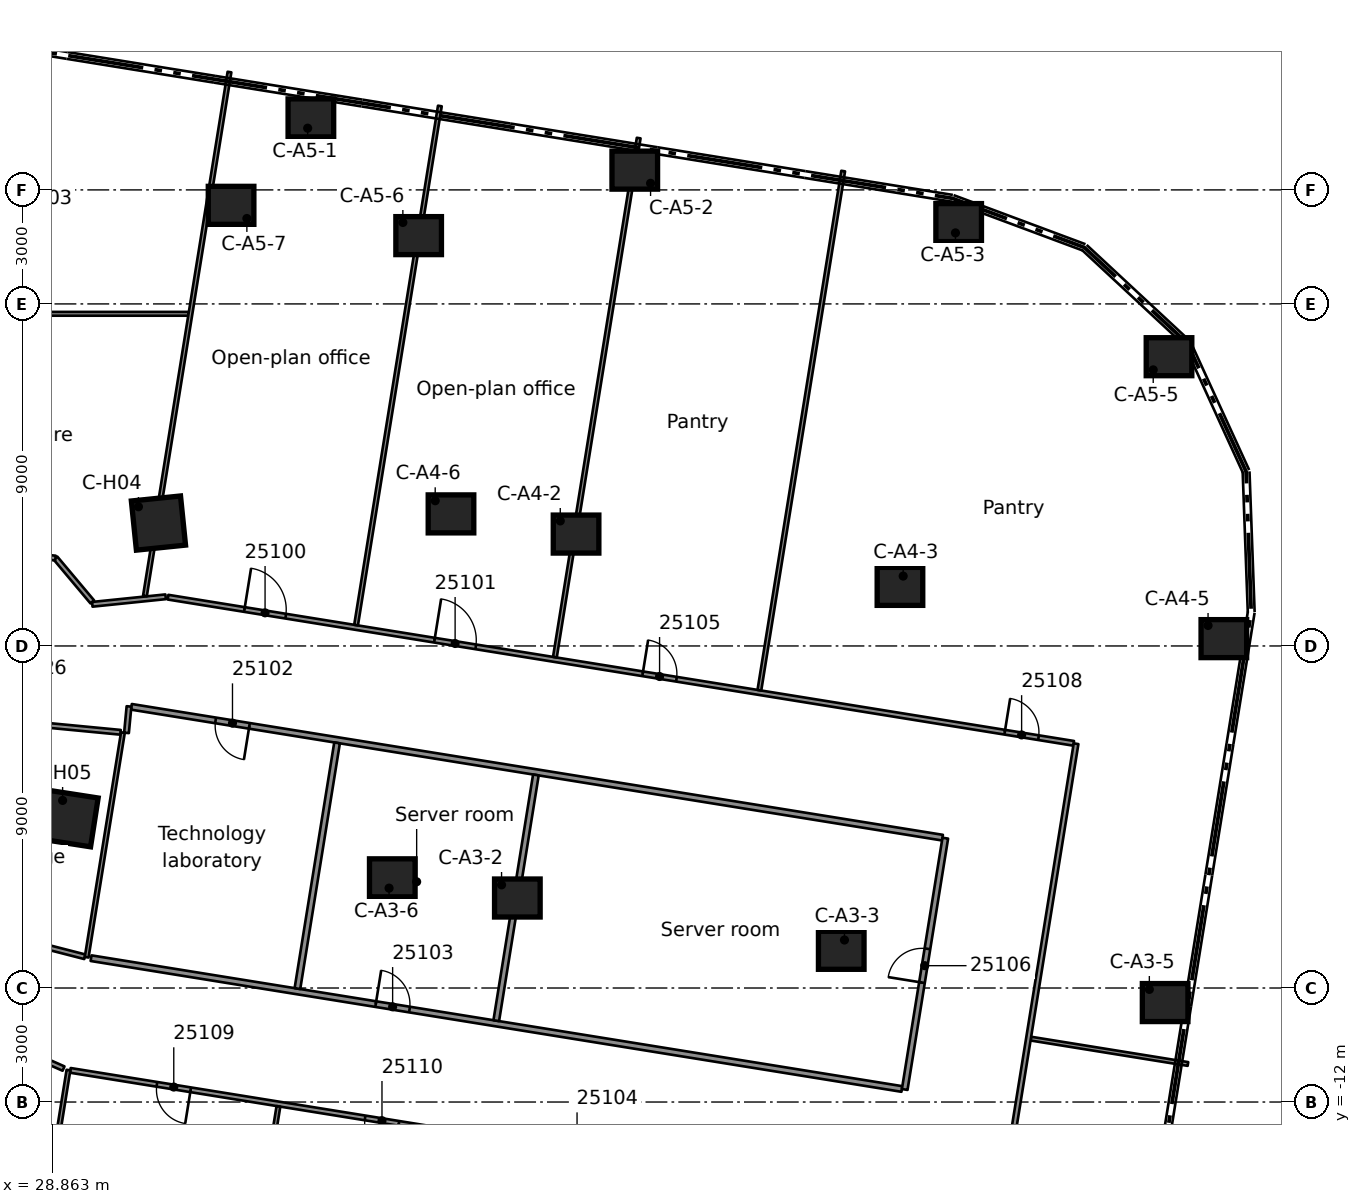
"""IFC4 building model, lengths in metres.
Left out: names, types, materials, properties, quantities, classifications, styles, units other than length and angle.
Written with IfcOpenShell. Run it as: python <this file> out.ifc"""

import sys

from ifc_helpers import new_model, si_unit, direction, frame, frame_2d, origin, origin_2d, place, context, subcontext, project, spatial, rectangle, extrude, element, fill, save


model = new_model("IFC4")
c1 = context("Model", 3, precision=1e-05, world=origin(), true_north=direction((0.0, 1.0)))
c2 = subcontext(c1, "Body", "Model", "MODEL_VIEW")
j1 = project(units=[si_unit("LENGTHUNIT", "METRE"), si_unit("PLANEANGLEUNIT", "RADIAN")], contexts=[c1])
p1 = place(None, origin())
s1 = spatial("IfcSite", under=j1, at=p1, CompositionType="ELEMENT")
p2 = place(p1, origin())
s2 = spatial("IfcBuilding", under=s1, at=p2, CompositionType="ELEMENT")
p3 = place(p2, frame((0.0, 0.0, 127.2)))
s3 = spatial("IfcBuildingStorey", under=s2, at=p3, CompositionType="ELEMENT", Elevation=127.2)
for number, where, z_axis, x_axis in (
    (1, (41.102, -6.632, 0.0), (0.0, 0.0, 1.0), (1.0, 0.0, 0.0)),
    (2, (49.625, -8.008, 0.0), (0.0, 0.0, 1.0), (1.0, 0.0, 0.0)),
    (3, (58.148, -9.383, 0.0), (0.0, 0.0, 1.0), (1.0, 0.0, 0.0)),
    (4, (37.811, -6.101, 0.0), (0.0, 0.0, 1.0), (1.0, 0.0, 0.0)),
    (5, (42.647, 2.944, 0.0), (0.0, 0.0, 1.0), (1.0, 0.0, 0.0)),
    (6, (51.17, 1.568, 0.0), (0.0, 0.0, 1.0), (1.0, 0.0, 0.0)),
    (7, (59.693, 0.193, 0.0), (0.0, 0.0, 1.0), (1.0, 0.0, 0.0)),
    (8, (39.356, 3.475, 0.0), (0.0, 0.0, 1.0), (1.0, 0.0, 0.0)),
    (9, (35.669, 13.895, 0.0), (0.0, 0.0, 1.0), (1.0, 0.0, 0.0)),
    (10, (44.192, 12.52, 0.0), (0.0, 0.0, 1.0), (1.0, 0.0, 0.0)),
    (11, (52.715, 11.14, 0.0), (0.0, 0.0, 1.0), (1.0, 0.0, 0.0)),
    (12, (58.25, 7.611, 0.0), (0.0, 0.0, 1.0), (1.0, 0.0, 0.0)),
    (13, (38.505, 10.797, 0.0), (0.0, 0.0, 1.0), (1.0, 0.0, 0.0)),
    (14, (33.569, 11.594, 0.0), (0.0, 0.0, 1.0), (1.0, 0.0, 0.0)),
):
    element("IfcColumn", number, at=place(p3, frame(where, z_axis=z_axis, x_axis=x_axis)), inside=s3, PredefinedType="COLUMN", context=c2, shape_type="SweptSolid", body=[
        extrude(rectangle(XDim=1.2, YDim=1.0, at=origin_2d()), origin(), (0.0, 0.0, 1.0), 3.5),
    ])
for number, where, z_axis, x_axis in (
    (15, (31.658, 3.234, 0.0), (0.0, 0.0, 1.0), (0.995, 0.102, 0.0)),
    (16, (29.329, -4.543, 0.0), (0.0, 0.0, 1.0), (0.988, -0.153, 0.0)),
):
    element("IfcColumn", number, at=place(p3, frame(where, z_axis=z_axis, x_axis=x_axis)), inside=s3, PredefinedType="COLUMN", context=c2, shape_type="SweptSolid", body=[
        extrude(rectangle(XDim=1.3, YDim=1.3, at=origin_2d()), origin(), (0.0, 0.0, 1.0), 3.5),
    ])
p4 = place(p3, frame((29.918, 1.158, 0.0), z_axis=(0.0, 0.0, 1.0), x_axis=(-0.643093382336, 0.765787765374, 0.0)))
e17 = element("IfcWall", 17, at=p4, inside=s3, PredefinedType="PARTITIONING", context=c2, shape_type="SweptSolid", body=[
    extrude(rectangle(XDim=1.508, YDim=0.125, at=frame_2d((0.754, 0.0))), origin(), (0.0, 0.0, 1.0), 3.08),
])
p5 = place(p3, frame((26.094, -9.763, 0.0), z_axis=(0.0, 0.0, 1.0), x_axis=(0.914414080566, -0.404780050475, 0.0)))
e18 = element("IfcWall", 18, at=p5, inside=s3, PredefinedType="PARTITIONING", context=c2, shape_type="SweptSolid", body=[
    extrude(rectangle(XDim=3.353, YDim=0.125, at=frame_2d((1.676, 0.0))), origin(), (0.0, 0.0, 1.0), 3.08),
])
p6 = place(p3, frame((25.95, -7.208, 0.0), z_axis=(0.0, 0.0, 1.0), x_axis=(0.968475214554, -0.249109933149, 0.0)))
e19 = element("IfcWall", 19, at=p6, inside=s3, PredefinedType="PARTITIONING", context=c2, shape_type="SweptSolid", body=[
    extrude(rectangle(XDim=3.894, YDim=0.125, at=frame_2d((1.947, 0.0))), origin(), (0.0, 0.0, 1.0), 3.08),
])
p7 = place(p3, frame((53.719, -15.1, 0.0), z_axis=(0.0, 0.0, 1.0), x_axis=(-0.987235605508, 0.159266629328, 0.0)))
e20 = element("IfcWall", 20, at=p7, inside=s3, PredefinedType="PARTITIONING", context=c2, shape_type="SweptSolid", body=[
    extrude(rectangle(XDim=24.695, YDim=0.125, at=frame_2d((12.348, 0.0))), origin(), (0.0, 0.0, 1.0), 3.08),
])
p8 = place(p7, frame((10.739, 0.0, 0.0)))
e21 = element("IfcOpeningElement", 21, at=p8, cuts=e20, PredefinedType="OPENING", context=c2, shape_type="SweptSolid", body=[
    extrude(rectangle(XDim=0.9, YDim=2.1, at=frame_2d((0.45, 1.05))), frame((0.0, 0.073, 0.0), z_axis=(0.0, -1.0, 0.0), x_axis=(1.0, 0.0, 0.0)), (0.0, 0.0, 1.0), 0.145),
])
p9 = place(p7, frame((1.038, 0.0, 0.0)))
e22 = element("IfcOpeningElement", 22, at=p9, cuts=e20, PredefinedType="OPENING", context=c2, shape_type="SweptSolid", body=[
    extrude(rectangle(XDim=0.9, YDim=2.1, at=frame_2d((0.45, 1.05))), frame((0.0, 0.073, 0.0), z_axis=(0.0, -1.0, 0.0), x_axis=(1.0, 0.0, 0.0)), (0.0, 0.0, 1.0), 0.145),
])
p10 = place(p7, frame((21.488, 0.0, 0.0)))
e23 = element("IfcOpeningElement", 23, at=p10, cuts=e20, PredefinedType="OPENING", context=c2, shape_type="SweptSolid", body=[
    extrude(rectangle(XDim=0.9, YDim=2.1, at=frame_2d((0.45, 1.05))), frame((0.0, 0.073, 0.0), z_axis=(0.0, -1.0, 0.0), x_axis=(1.0, 0.0, 0.0)), (0.0, 0.0, 1.0), 0.145),
])
p11 = place(p7, frame((15.938, 0.0, 0.0)))
e24 = element("IfcOpeningElement", 24, at=p11, cuts=e20, PredefinedType="OPENING", context=c2, shape_type="SweptSolid", body=[
    extrude(rectangle(XDim=0.9, YDim=2.1, at=frame_2d((0.45, 1.05))), frame((0.0, 0.073, 0.0), z_axis=(0.0, -1.0, 0.0), x_axis=(1.0, 0.0, 0.0)), (0.0, 0.0, 1.0), 0.145),
])
p12 = place(p3, frame((29.885, -8.215, 0.0), z_axis=(0.0, 0.0, 1.0), x_axis=(0.987236652076, -0.1592601419, 0.0)))
e25 = element("IfcWall", 25, at=p12, inside=s3, PredefinedType="PARTITIONING", context=c2, shape_type="SweptSolid", body=[
    extrude(rectangle(XDim=21.612, YDim=0.15, at=frame_2d((10.806, 0.0))), origin(), (0.0, 0.0, 1.0), 3.08),
])
p13 = place(p12, frame((7.588, 0.0, 0.0)))
e26 = element("IfcOpeningElement", 26, at=p13, cuts=e25, PredefinedType="OPENING", context=c2, shape_type="SweptSolid", body=[
    extrude(rectangle(XDim=0.9, YDim=2.1, at=frame_2d((0.45, 1.05))), frame((0.0, 0.085, 0.0), z_axis=(0.0, -1.0, 0.0), x_axis=(1.0, 0.0, 0.0)), (0.0, 0.0, 1.0), 0.17),
])
p14 = place(p3, frame((54.615, -10.332, 0.0), z_axis=(0.0, 0.0, 1.0), x_axis=(0.987227218169, -0.15931861067, 0.0)))
e27 = element("IfcWall", 27, at=p14, inside=s3, PredefinedType="PARTITIONING", context=c2, shape_type="SweptSolid", body=[
    extrude(rectangle(XDim=4.187, YDim=0.1, at=frame_2d((2.093, 0.0))), origin(), (0.0, 0.0, 1.0), 3.08),
])
p15 = place(p3, frame((52.289, -5.044, 0.0), z_axis=(0.0, 0.0, 1.0), x_axis=(-0.987239001867, 0.159245575114, 0.0)))
e28 = element("IfcWall", 28, at=p15, inside=s3, PredefinedType="PARTITIONING", context=c2, shape_type="SweptSolid", body=[
    extrude(rectangle(XDim=21.62, YDim=0.15, at=frame_2d((10.81, 0.0))), origin(), (0.0, 0.0, 1.0), 3.08),
])
p16 = place(p15, frame((18.475, 0.0, 0.0)))
e29 = element("IfcOpeningElement", 29, at=p16, cuts=e28, PredefinedType="OPENING", context=c2, shape_type="SweptSolid", body=[
    extrude(rectangle(XDim=0.9, YDim=2.1, at=frame_2d((0.45, 1.05))), frame((0.0, 0.085, 0.0), z_axis=(0.0, -1.0, 0.0), x_axis=(1.0, 0.0, 0.0)), (0.0, 0.0, 1.0), 0.17),
])
p17 = place(p3, frame((31.909, 1.284, 0.0), z_axis=(0.0, 0.0, 1.0), x_axis=(0.987227629246, -0.159316063386, 0.0)))
e30 = element("IfcWall", 30, at=p17, inside=s3, PredefinedType="PARTITIONING", context=c2, shape_type="SweptSolid", body=[
    extrude(rectangle(XDim=24.14, YDim=0.125, at=frame_2d((12.07, 0.0))), origin(), (0.0, 0.0, 1.0), 3.08),
])
p18 = place(p17, frame((2.038, 0.0, 0.0)))
e31 = element("IfcOpeningElement", 31, at=p18, cuts=e30, PredefinedType="OPENING", context=c2, shape_type="SweptSolid", body=[
    extrude(rectangle(XDim=1.1, YDim=2.1, at=frame_2d((0.55, 1.05))), frame((0.0, 0.073, 0.0), z_axis=(0.0, -1.0, 0.0), x_axis=(1.0, 0.0, 0.0)), (0.0, 0.0, 1.0), 0.145),
])
p19 = place(p17, frame((7.103, 0.0, 0.0)))
e32 = element("IfcOpeningElement", 32, at=p19, cuts=e30, PredefinedType="OPENING", context=c2, shape_type="SweptSolid", body=[
    extrude(rectangle(XDim=1.1, YDim=2.1, at=frame_2d((0.55, 1.05))), frame((0.0, 0.073, 0.0), z_axis=(0.0, -1.0, 0.0), x_axis=(1.0, 0.0, 0.0)), (0.0, 0.0, 1.0), 0.145),
])
p20 = place(p17, frame((12.653, 0.0, 0.0)))
e33 = element("IfcOpeningElement", 33, at=p20, cuts=e30, PredefinedType="OPENING", context=c2, shape_type="SweptSolid", body=[
    extrude(rectangle(XDim=0.9, YDim=2.1, at=frame_2d((0.45, 1.05))), frame((0.0, 0.073, 0.0), z_axis=(0.0, -1.0, 0.0), x_axis=(1.0, 0.0, 0.0)), (0.0, 0.0, 1.0), 0.145),
])
p21 = place(p17, frame((22.303, 0.0, 0.0)))
e34 = element("IfcOpeningElement", 34, at=p21, cuts=e30, PredefinedType="OPENING", context=c2, shape_type="SweptSolid", body=[
    extrude(rectangle(XDim=0.9, YDim=2.1, at=frame_2d((0.45, 1.05))), frame((0.0, 0.073, 0.0), z_axis=(0.0, -1.0, 0.0), x_axis=(1.0, 0.0, 0.0)), (0.0, 0.0, 1.0), 0.145),
])
p22 = place(p3, frame((30.661, -2.272, 0.0), z_axis=(0.0, 0.0, 1.0), x_axis=(-0.99545016826, 0.095283589939, 0.0)))
e35 = element("IfcWall", 35, at=p22, inside=s3, PredefinedType="PARTITIONING", context=c2, shape_type="SweptSolid", body=[
    extrude(rectangle(XDim=6.119, YDim=0.125, at=frame_2d((3.059, 0.0))), origin(), (0.0, 0.0, 1.0), 3.08),
])
p23 = place(p22, frame((2.538, 0.0, 0.0)))
e36 = element("IfcOpeningElement", 36, at=p23, cuts=e35, PredefinedType="OPENING", context=c2, shape_type="SweptSolid", body=[
    extrude(rectangle(XDim=1.0, YDim=2.1, at=frame_2d((0.5, 1.05))), frame((0.0, 0.073, 0.0), z_axis=(0.0, -1.0, 0.0), x_axis=(1.0, 0.0, 0.0)), (0.0, 0.0, 1.0), 0.145),
])
p24 = place(p3, frame((24.989, 2.692, 0.0), z_axis=(0.0, 0.0, 1.0), x_axis=(0.995451221245, -0.095272588516, 0.0)))
e37 = element("IfcWall", 37, at=p24, inside=s3, PredefinedType="PARTITIONING", context=c2, shape_type="SweptSolid", body=[
    extrude(rectangle(XDim=3.977, YDim=0.125, at=frame_2d((1.989, 0.0))), origin(), (0.0, 0.0, 1.0), 3.08),
])
p25 = place(p3, frame((21.512, 8.74, 0.0), z_axis=(0.0, 0.0, 1.0), x_axis=(1.0, 0.0, 0.0)))
e38 = element("IfcWall", 38, at=p25, inside=s3, PredefinedType="PARTITIONING", context=c2, shape_type="SweptSolid", body=[
    extrude(rectangle(XDim=10.939, YDim=0.1, at=frame_2d((5.469, 0.0))), origin(), (0.0, 0.0, 1.0), 3.08),
])
p26 = place(p3, frame((31.847, 1.294, 0.0), z_axis=(0.0, 0.0, 1.0), x_axis=(-0.9947784907, -0.102057603537, 0.0)))
e39 = element("IfcWall", 39, at=p26, inside=s3, PredefinedType="PARTITIONING", context=c2, shape_type="SweptSolid", body=[
    extrude(rectangle(XDim=1.94, YDim=0.125, at=frame_2d((0.97, 0.0))), origin(), (0.0, 0.0, 1.0), 3.08),
])
p27 = place(p3, frame((53.78, -15.111, 0.0), z_axis=(0.0, 0.0, 1.0), x_axis=(0.159347260632, 0.987222594215, 0.0)))
e40 = element("IfcWall", 40, at=p27, inside=s3, PredefinedType="PARTITIONING", context=c2, shape_type="SweptSolid", body=[
    extrude(rectangle(XDim=12.701, YDim=0.125, at=frame_2d((6.351, 0.0))), origin(), (0.0, 0.0, 1.0), 3.08),
])
p28 = place(p3, frame((51.295, -11.67, 0.0), z_axis=(0.0, 0.0, 1.0), x_axis=(0.159450148398, 0.987205981635, 0.0)))
e41 = element("IfcWall", 41, at=p28, inside=s3, PredefinedType="PARTITIONING", context=c2, shape_type="SweptSolid", body=[
    extrude(rectangle(XDim=6.699, YDim=0.15, at=frame_2d((3.349, 0.0))), origin(), (0.0, 0.0, 1.0), 3.08),
])
p29 = place(p28, frame((2.85, 0.0, 0.0)))
e42 = element("IfcOpeningElement", 42, at=p29, cuts=e41, PredefinedType="OPENING", context=c2, shape_type="SweptSolid", body=[
    extrude(rectangle(XDim=0.9, YDim=2.1, at=frame_2d((0.45, 1.05))), frame((0.0, 0.085, 0.0), z_axis=(0.0, -1.0, 0.0), x_axis=(1.0, 0.0, 0.0)), (0.0, 0.0, 1.0), 0.17),
])
p30 = place(p3, frame((47.471, -1.164, 0.0), z_axis=(0.0, 0.0, 1.0), x_axis=(0.159361135309, 0.987220354608, 0.0)))
e43 = element("IfcWall", 43, at=p30, inside=s3, PredefinedType="PARTITIONING", context=c2, shape_type="SweptSolid", body=[
    extrude(rectangle(XDim=13.837, YDim=0.1, at=frame_2d((6.918, 0.0))), origin(), (0.0, 0.0, 1.0), 3.08),
])
p31 = place(p3, frame((40.547, -9.859, 0.0), z_axis=(0.0, 0.0, 1.0), x_axis=(0.159269947871, 0.987235070135, 0.0)))
e44 = element("IfcWall", 44, at=p31, inside=s3, PredefinedType="PARTITIONING", context=c2, shape_type="SweptSolid", body=[
    extrude(rectangle(XDim=6.548, YDim=0.15, at=frame_2d((3.274, 0.0))), origin(), (0.0, 0.0, 1.0), 3.08),
])
p32 = place(p3, frame((42.09, -0.295, 0.0), z_axis=(0.0, 0.0, 1.0), x_axis=(0.159357818258, 0.987220890055, 0.0)))
e45 = element("IfcWall", 45, at=p32, inside=s3, PredefinedType="PARTITIONING", context=c2, shape_type="SweptSolid", body=[
    extrude(rectangle(XDim=13.836, YDim=0.1, at=frame_2d((6.918, 0.0))), origin(), (0.0, 0.0, 1.0), 3.08),
])
p33 = place(p3, frame((32.61, -25.774, 0.0), z_axis=(0.0, 0.0, 1.0), x_axis=(0.159346714874, 0.987222682306, 0.0)))
e46 = element("IfcWall", 46, at=p33, inside=s3, PredefinedType="PARTITIONING", context=c2, shape_type="SweptSolid", body=[
    extrude(rectangle(XDim=13.837, YDim=0.1, at=frame_2d((6.918, 0.0))), origin(), (0.0, 0.0, 1.0), 3.08),
])
p34 = place(p3, frame((35.315, -9.015, 0.0), z_axis=(0.0, 0.0, 1.0), x_axis=(0.159269947871, 0.987235070135, 0.0)))
e47 = element("IfcWall", 47, at=p34, inside=s3, PredefinedType="PARTITIONING", context=c2, shape_type="SweptSolid", body=[
    extrude(rectangle(XDim=6.548, YDim=0.15, at=frame_2d((3.274, 0.0))), origin(), (0.0, 0.0, 1.0), 3.08),
])
p35 = place(p3, frame((36.858, 0.549, 0.0), z_axis=(0.0, 0.0, 1.0), x_axis=(0.159375015721, 0.987218113876, 0.0)))
e48 = element("IfcWall", 48, at=p35, inside=s3, PredefinedType="PARTITIONING", context=c2, shape_type="SweptSolid", body=[
    extrude(rectangle(XDim=13.836, YDim=0.1, at=frame_2d((6.918, 0.0))), origin(), (0.0, 0.0, 1.0), 3.08),
])
p36 = place(p3, frame((27.075, -24.881, 0.0), z_axis=(0.0, 0.0, 1.0), x_axis=(0.159361105938, 0.987220359349, 0.0)))
e49 = element("IfcWall", 49, at=p36, inside=s3, PredefinedType="PARTITIONING", context=c2, shape_type="SweptSolid", body=[
    extrude(rectangle(XDim=13.9, YDim=0.1, at=frame_2d((6.95, 0.0))), origin(), (0.0, 0.0, 1.0), 3.08),
])
p37 = place(p3, frame((29.769, -8.19, 0.0), z_axis=(0.0, 0.0, 1.0), x_axis=(0.15928627412, 0.987232436094, 0.0)))
e50 = element("IfcWall", 50, at=p37, inside=s3, PredefinedType="PARTITIONING", context=c2, shape_type="SweptSolid", body=[
    extrude(rectangle(XDim=5.988, YDim=0.1, at=frame_2d((2.994, 0.0))), origin(), (0.0, 0.0, 1.0), 3.08),
])
p38 = place(p3, frame((31.302, 1.314, 0.0), z_axis=(0.0, 0.0, 1.0), x_axis=(0.159328073175, 0.987225691065, 0.0)))
e51 = element("IfcWall", 51, at=p38, inside=s3, PredefinedType="PARTITIONING", context=c2, shape_type="SweptSolid", body=[
    extrude(rectangle(XDim=13.966, YDim=0.1, at=frame_2d((6.983, 0.0))), origin(), (0.0, 0.0, 1.0), 3.08),
])
p39 = place(p3, frame((30.817, -2.287, 0.0), z_axis=(0.0, 0.0, 1.0), x_axis=(0.094627831228, 0.995512718933, 0.0)))
e52 = element("IfcWall", 52, at=p39, inside=s3, PredefinedType="PARTITIONING", context=c2, shape_type="SweptSolid", body=[
    extrude(rectangle(XDim=0.699, YDim=0.125, at=frame_2d((0.35, 0.0))), origin(), (0.0, 0.0, 1.0), 3.08),
])
p40 = place(p18, origin())
e53 = element("IfcDoor", 53, at=p40, inside=s3, OperationType="SINGLE_SWING_LEFT", PredefinedType="DOOR", context=c2, shape_type="SweptSolid", body=[
    extrude(rectangle(XDim=1.1, YDim=2.1, at=frame_2d((0.55, 1.05))), frame((0.0, 0.025, 0.0), z_axis=(0.0, -1.0, 0.0), x_axis=(1.0, 0.0, 0.0)), (0.0, 0.0, 1.0), 0.05),
])
fill(e31, e53)
p41 = place(p19, origin())
e54 = element("IfcDoor", 54, at=p41, inside=s3, OperationType="SINGLE_SWING_LEFT", PredefinedType="DOOR", context=c2, shape_type="SweptSolid", body=[
    extrude(rectangle(XDim=1.1, YDim=2.1, at=frame_2d((0.55, 1.05))), frame((0.0, 0.025, 0.0), z_axis=(0.0, -1.0, 0.0), x_axis=(1.0, 0.0, 0.0)), (0.0, 0.0, 1.0), 0.05),
])
fill(e32, e54)
p42 = place(p16, origin())
e55 = element("IfcDoor", 55, at=p42, inside=s3, OperationType="SINGLE_SWING_RIGHT", PredefinedType="DOOR", context=c2, shape_type="SweptSolid", body=[
    extrude(rectangle(XDim=0.9, YDim=2.1, at=frame_2d((0.45, 1.05))), frame((0.0, 0.025, 0.0), z_axis=(0.0, -1.0, 0.0), x_axis=(1.0, 0.0, 0.0)), (0.0, 0.0, 1.0), 0.05),
])
fill(e29, e55)
p43 = place(p13, origin())
e56 = element("IfcDoor", 56, at=p43, inside=s3, OperationType="SINGLE_SWING_LEFT", PredefinedType="DOOR", context=c2, shape_type="SweptSolid", body=[
    extrude(rectangle(XDim=0.9, YDim=2.1, at=frame_2d((0.45, 1.05))), frame((0.0, 0.025, 0.0), z_axis=(0.0, -1.0, 0.0), x_axis=(1.0, 0.0, 0.0)), (0.0, 0.0, 1.0), 0.05),
])
fill(e26, e56)
p44 = place(p20, origin())
e57 = element("IfcDoor", 57, at=p44, inside=s3, OperationType="SINGLE_SWING_RIGHT", PredefinedType="DOOR", context=c2, shape_type="SweptSolid", body=[
    extrude(rectangle(XDim=0.9, YDim=2.1, at=frame_2d((0.45, 1.05))), frame((0.0, 0.025, 0.0), z_axis=(0.0, -1.0, 0.0), x_axis=(1.0, 0.0, 0.0)), (0.0, 0.0, 1.0), 0.05),
])
fill(e33, e57)
p45 = place(p29, origin())
e58 = element("IfcDoor", 58, at=p45, inside=s3, OperationType="SINGLE_SWING_LEFT", PredefinedType="DOOR", context=c2, shape_type="SweptSolid", body=[
    extrude(rectangle(XDim=0.9, YDim=2.1, at=frame_2d((0.45, 1.05))), frame((0.0, 0.025, 0.0), z_axis=(0.0, -1.0, 0.0), x_axis=(1.0, 0.0, 0.0)), (0.0, 0.0, 1.0), 0.05),
])
fill(e42, e58)
p46 = place(p21, origin())
e59 = element("IfcDoor", 59, at=p46, inside=s3, OperationType="SINGLE_SWING_RIGHT", PredefinedType="DOOR", context=c2, shape_type="SweptSolid", body=[
    extrude(rectangle(XDim=0.9, YDim=2.1, at=frame_2d((0.45, 1.05))), frame((0.0, 0.025, 0.0), z_axis=(0.0, -1.0, 0.0), x_axis=(1.0, 0.0, 0.0)), (0.0, 0.0, 1.0), 0.05),
])
fill(e34, e59)
p47 = place(p10, origin())
e60 = element("IfcDoor", 60, at=p47, inside=s3, OperationType="SINGLE_SWING_RIGHT", PredefinedType="DOOR", context=c2, shape_type="SweptSolid", body=[
    extrude(rectangle(XDim=0.9, YDim=2.1, at=frame_2d((0.45, 1.05))), frame((0.0, 0.025, 0.0), z_axis=(0.0, -1.0, 0.0), x_axis=(1.0, 0.0, 0.0)), (0.0, 0.0, 1.0), 0.05),
])
fill(e23, e60)
p48 = place(p11, origin())
e61 = element("IfcDoor", 61, at=p48, inside=s3, OperationType="SINGLE_SWING_RIGHT", PredefinedType="DOOR", context=c2, shape_type="SweptSolid", body=[
    extrude(rectangle(XDim=0.9, YDim=2.1, at=frame_2d((0.45, 1.05))), frame((0.0, 0.025, 0.0), z_axis=(0.0, -1.0, 0.0), x_axis=(1.0, 0.0, 0.0)), (0.0, 0.0, 1.0), 0.05),
])
fill(e24, e61)
save(model, sys.argv[1])
